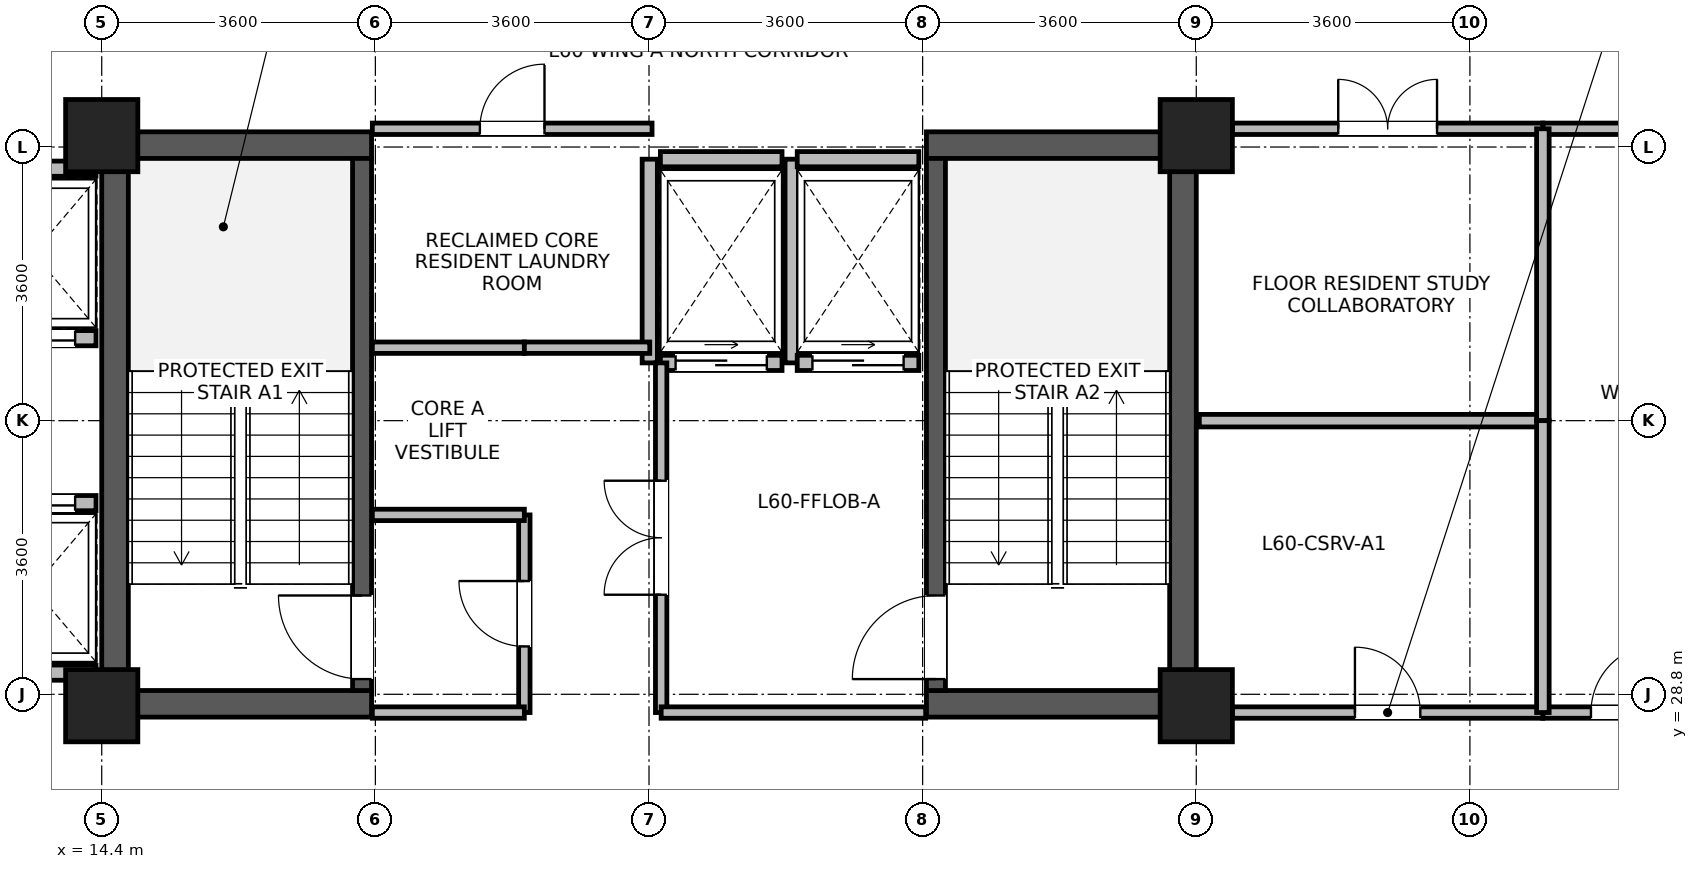
"""IFC4 building model, lengths in metres.
Left out: names, types, materials, properties, quantities, classifications, styles, units other than length and angle.
Written with IfcOpenShell. Run it as: python <this file> out.ifc"""

import sys

from ifc_helpers import new_model, si_unit, direction, frame, frame_2d, origin, origin_2d, place, context, subcontext, project, spatial, rectangle, extrude, source, transform, mapped, element, fill, save


model = new_model("IFC4")
c1 = context("Model", 3, precision=1e-05, world=origin(), true_north=direction((0.0, 1.0)))
c2 = subcontext(c1, "Body", "Model", "MODEL_VIEW")
j1 = project(units=[si_unit("LENGTHUNIT", "METRE"), si_unit("PLANEANGLEUNIT", "RADIAN")], contexts=[c1])
p1 = place(None, origin())
s1 = spatial("IfcSite", under=j1, at=p1, CompositionType="ELEMENT")
p2 = place(p1, origin())
s2 = spatial("IfcBuilding", under=s1, at=p2, CompositionType="ELEMENT")
p3 = place(p2, frame((0.0, 0.0, 235.1)))
s3 = spatial("IfcBuildingStorey", under=s2, at=p3, CompositionType="ELEMENT", Elevation=235.1)
for number, where, z_axis, x_axis in (
    (1, (14.575, 28.5, 0.0), (0.0, 0.0, 1.0), (0.0, 1.0, 0.0)),
    (2, (28.625, 28.5, 0.0), (0.0, 0.0, 1.0), (0.0, 1.0, 0.0)),
):
    element("IfcWall", number, at=place(p3, frame(where, z_axis=z_axis, x_axis=x_axis)), inside=s3, PredefinedType="SHEAR", context=c2, shape_type="SweptSolid", body=[
        extrude(rectangle(XDim=7.7, YDim=0.35, at=frame_2d((3.85, 0.0))), origin(), (0.0, 0.0, 1.0), 3.44),
    ])
for number, where, z_axis, x_axis in (
    (3, (14.75, 28.675, 0.0), (0.0, 0.0, 1.0), (1.0, 0.0, 0.0)),
    (4, (25.25, 28.675, 0.0), (0.0, 0.0, 1.0), (1.0, 0.0, 0.0)),
    (5, (14.75, 36.025, 0.0), (0.0, 0.0, 1.0), (1.0, 0.0, 0.0)),
    (6, (25.25, 36.025, 0.0), (0.0, 0.0, 1.0), (1.0, 0.0, 0.0)),
):
    element("IfcWall", number, at=place(p3, frame(where, z_axis=z_axis, x_axis=x_axis)), inside=s3, PredefinedType="SHEAR", context=c2, shape_type="SweptSolid", body=[
        extrude(rectangle(XDim=3.2, YDim=0.35, at=frame_2d((1.6, 0.0))), origin(), (0.0, 0.0, 1.0), 3.44),
    ])
p4 = place(p3, frame((17.825, 28.85, 0.0), z_axis=(0.0, 0.0, 1.0), x_axis=(0.0, 1.0, 0.0)))
e7 = element("IfcWall", 7, at=p4, inside=s3, PredefinedType="SHEAR", context=c2, shape_type="SweptSolid", body=[
    extrude(rectangle(XDim=7.0, YDim=0.25, at=frame_2d((3.5, 0.0))), origin(), (0.0, 0.0, 1.0), 3.44),
])
p5 = place(p4, frame((0.15, 0.0, 0.0)))
e8 = element("IfcOpeningElement", 8, at=p5, cuts=e7, PredefinedType="OPENING", context=c2, shape_type="SweptSolid", body=[
    extrude(rectangle(XDim=1.1, YDim=2.08, at=frame_2d((0.55, 1.04))), frame((0.0, 0.135, 0.0), z_axis=(0.0, -1.0, 0.0), x_axis=(1.0, 0.0, 0.0)), (0.0, 0.0, 1.0), 0.27),
])
p6 = place(p3, frame((25.375, 28.85, 0.0), z_axis=(0.0, 0.0, 1.0), x_axis=(0.0, 1.0, 0.0)))
e9 = element("IfcWall", 9, at=p6, inside=s3, PredefinedType="SHEAR", context=c2, shape_type="SweptSolid", body=[
    extrude(rectangle(XDim=7.0, YDim=0.25, at=frame_2d((3.5, 0.0))), origin(), (0.0, 0.0, 1.0), 3.44),
])
p7 = place(p6, frame((0.15, 0.0, 0.0)))
e10 = element("IfcOpeningElement", 10, at=p7, cuts=e9, PredefinedType="OPENING", context=c2, shape_type="SweptSolid", body=[
    extrude(rectangle(XDim=1.1, YDim=2.08, at=frame_2d((0.55, 1.04))), frame((0.0, 0.135, 0.0), z_axis=(0.0, -1.0, 0.0), x_axis=(1.0, 0.0, 0.0)), (0.0, 0.0, 1.0), 0.27),
])
m1 = source(origin(), c2, "Body", "SweptSolid", [
    extrude(rectangle(XDim=0.95, YDim=0.95, at=origin_2d()), origin(), (0.0, 0.0, 1.0), 3.7),
])
for number, where, z_axis, x_axis in (
    (11, (14.4, 28.65, 0.0), (0.0, 0.0, 1.0), (1.0, 0.0, 0.0)),
    (12, (14.4, 36.15, 0.0), (0.0, 0.0, 1.0), (1.0, 0.0, 0.0)),
    (13, (28.8, 28.65, 0.0), (0.0, 0.0, 1.0), (1.0, 0.0, 0.0)),
    (14, (28.8, 36.15, 0.0), (0.0, 0.0, 1.0), (1.0, 0.0, 0.0)),
):
    element("IfcColumn", number, at=place(p3, frame(where, z_axis=z_axis, x_axis=x_axis)), inside=s3, PredefinedType="COLUMN", context=c2, shape_type="MappedRepresentation", body=[
        mapped(m1, transform((0.0, 0.0, 0.0), x_axis=(1.0, 0.0, 0.0), y_axis=(0.0, 1.0, 0.0), z_axis=(0.0, 0.0, 1.0), scale=1.0)),
    ])
p8 = place(p3, frame((12.675, 33.485, 0.0), z_axis=(0.0, 0.0, 1.0), x_axis=(1.0, 0.0, 0.0)))
e15 = element("IfcWall", 15, at=p8, inside=s3, PredefinedType="PARTITIONING", context=c2, shape_type="SweptSolid", body=[
    extrude(rectangle(XDim=1.65, YDim=0.2, at=frame_2d((0.825, 0.0))), origin(), (0.0, 0.0, 1.0), 3.42),
])
p9 = place(p8, frame((0.275, 0.0, 0.0)))
e16 = element("IfcOpeningElement", 16, at=p9, cuts=e15, PredefinedType="OPENING", context=c2, shape_type="SweptSolid", body=[
    extrude(rectangle(XDim=1.1, YDim=2.12, at=frame_2d((0.55, 1.06))), frame((0.0, 0.11, 0.0), z_axis=(0.0, -1.0, 0.0), x_axis=(1.0, 0.0, 0.0)), (0.0, 0.0, 1.0), 0.22),
])
for number, where, z_axis, x_axis in (
    (17, (12.675, 35.715, 0.0), (0.0, 0.0, 1.0), (1.0, 0.0, 0.0)),
    (18, (12.675, 29.085, 0.0), (0.0, 0.0, 1.0), (1.0, 0.0, 0.0)),
):
    element("IfcWall", number, at=place(p3, frame(where, z_axis=z_axis, x_axis=x_axis)), inside=s3, PredefinedType="PARTITIONING", context=c2, shape_type="SweptSolid", body=[
        extrude(rectangle(XDim=1.65, YDim=0.2, at=frame_2d((0.825, 0.0))), origin(), (0.0, 0.0, 1.0), 3.42),
    ])
p10 = place(p3, frame((12.675, 31.315, 0.0), z_axis=(0.0, 0.0, 1.0), x_axis=(1.0, 0.0, 0.0)))
e19 = element("IfcWall", 19, at=p10, inside=s3, PredefinedType="PARTITIONING", context=c2, shape_type="SweptSolid", body=[
    extrude(rectangle(XDim=1.65, YDim=0.2, at=frame_2d((0.825, 0.0))), origin(), (0.0, 0.0, 1.0), 3.42),
])
p11 = place(p10, frame((0.275, 0.0, 0.0)))
e20 = element("IfcOpeningElement", 20, at=p11, cuts=e19, PredefinedType="OPENING", context=c2, shape_type="SweptSolid", body=[
    extrude(rectangle(XDim=1.1, YDim=2.12, at=frame_2d((0.55, 1.06))), frame((0.0, 0.11, 0.0), z_axis=(0.0, -1.0, 0.0), x_axis=(1.0, 0.0, 0.0)), (0.0, 0.0, 1.0), 0.22),
])
p12 = place(p3, frame((21.75, 33.16, 0.0), z_axis=(0.0, 0.0, 1.0), x_axis=(1.0, 0.0, 0.0)))
e21 = element("IfcWall", 21, at=p12, inside=s3, PredefinedType="PARTITIONING", context=c2, shape_type="SweptSolid", body=[
    extrude(rectangle(XDim=1.6, YDim=0.2, at=frame_2d((0.8, 0.0))), origin(), (0.0, 0.0, 1.0), 3.42),
])
p13 = place(p12, frame((0.2, 0.0, 0.0)))
e22 = element("IfcOpeningElement", 22, at=p13, cuts=e21, PredefinedType="OPENING", context=c2, shape_type="SweptSolid", body=[
    extrude(rectangle(XDim=1.2, YDim=2.12, at=frame_2d((0.6, 1.06))), frame((0.0, 0.11, 0.0), z_axis=(0.0, -1.0, 0.0), x_axis=(1.0, 0.0, 0.0)), (0.0, 0.0, 1.0), 0.22),
])
p14 = place(p3, frame((21.75, 35.84, 0.0), z_axis=(0.0, 0.0, 1.0), x_axis=(1.0, 0.0, 0.0)))
e23 = element("IfcWall", 23, at=p14, inside=s3, PredefinedType="PARTITIONING", context=c2, shape_type="SweptSolid", body=[
    extrude(rectangle(XDim=1.6, YDim=0.2, at=frame_2d((0.8, 0.0))), origin(), (0.0, 0.0, 1.0), 2.52),
])
for number, where, z_axis, x_axis in (
    (24, (21.61, 33.16, 0.0), (0.0, 0.0, 1.0), (0.0, 1.0, 0.0)),
    (25, (23.49, 33.16, 0.0), (0.0, 0.0, 1.0), (0.0, 1.0, 0.0)),
):
    element("IfcWall", number, at=place(p3, frame(where, z_axis=z_axis, x_axis=x_axis)), inside=s3, PredefinedType="PARTITIONING", context=c2, shape_type="SweptSolid", body=[
        extrude(rectangle(XDim=2.68, YDim=0.2, at=frame_2d((1.34, 0.0))), origin(), (0.0, 0.0, 1.0), 3.42),
    ])
p15 = place(p3, frame((23.55, 33.16, 0.0), z_axis=(0.0, 0.0, 1.0), x_axis=(1.0, 0.0, 0.0)))
e26 = element("IfcWall", 26, at=p15, inside=s3, PredefinedType="PARTITIONING", context=c2, shape_type="SweptSolid", body=[
    extrude(rectangle(XDim=1.6, YDim=0.2, at=frame_2d((0.8, 0.0))), origin(), (0.0, 0.0, 1.0), 3.42),
])
p16 = place(p15, frame((0.2, 0.0, 0.0)))
e27 = element("IfcOpeningElement", 27, at=p16, cuts=e26, PredefinedType="OPENING", context=c2, shape_type="SweptSolid", body=[
    extrude(rectangle(XDim=1.2, YDim=2.12, at=frame_2d((0.6, 1.06))), frame((0.0, 0.11, 0.0), z_axis=(0.0, -1.0, 0.0), x_axis=(1.0, 0.0, 0.0)), (0.0, 0.0, 1.0), 0.22),
])
p17 = place(p3, frame((23.55, 35.84, 0.0), z_axis=(0.0, 0.0, 1.0), x_axis=(1.0, 0.0, 0.0)))
e28 = element("IfcWall", 28, at=p17, inside=s3, PredefinedType="PARTITIONING", context=c2, shape_type="SweptSolid", body=[
    extrude(rectangle(XDim=1.6, YDim=0.2, at=frame_2d((0.8, 0.0))), origin(), (0.0, 0.0, 1.0), 2.52),
])
p18 = place(p3, frame((33.36, 28.56, 0.0), z_axis=(0.0, 0.0, 1.0), x_axis=(1.0, 0.0, 0.0)))
e29 = element("IfcWall", 29, at=p18, inside=s3, PredefinedType="PARTITIONING", context=c2, shape_type="SweptSolid", body=[
    extrude(rectangle(XDim=2.165, YDim=0.15, at=frame_2d((1.083, 0.0))), origin(), (0.0, 0.0, 1.0), 2.87),
])
p19 = place(p18, frame((0.633, 0.0, 0.0)))
e30 = element("IfcOpeningElement", 30, at=p19, cuts=e29, PredefinedType="OPENING", context=c2, shape_type="SweptSolid", body=[
    extrude(rectangle(XDim=0.9, YDim=2.08, at=frame_2d((0.45, 1.04))), frame((0.0, 0.085, 0.0), z_axis=(0.0, -1.0, 0.0), x_axis=(1.0, 0.0, 0.0)), (0.0, 0.0, 1.0), 0.17),
])
p20 = place(p3, frame((33.36, 36.24, 0.0), z_axis=(0.0, 0.0, 1.0), x_axis=(1.0, 0.0, 0.0)))
e31 = element("IfcWall", 31, at=p20, inside=s3, PredefinedType="PARTITIONING", context=c2, shape_type="SweptSolid", body=[
    extrude(rectangle(XDim=2.165, YDim=0.15, at=frame_2d((1.083, 0.0))), origin(), (0.0, 0.0, 1.0), 2.87),
])
p21 = place(p3, frame((29.275, 28.56, 0.0), z_axis=(0.0, 0.0, 1.0), x_axis=(1.0, 0.0, 0.0)))
e32 = element("IfcWall", 32, at=p21, inside=s3, PredefinedType="PARTITIONING", context=c2, shape_type="SweptSolid", body=[
    extrude(rectangle(XDim=4.085, YDim=0.15, at=frame_2d((2.042, 0.0))), origin(), (0.0, 0.0, 1.0), 2.87),
])
p22 = place(p21, frame((1.613, 0.0, 0.0)))
e33 = element("IfcOpeningElement", 33, at=p22, cuts=e32, PredefinedType="OPENING", context=c2, shape_type="SweptSolid", body=[
    extrude(rectangle(XDim=0.86, YDim=2.02, at=frame_2d((0.43, 1.01))), frame((0.0, 0.085, 0.0), z_axis=(0.0, -1.0, 0.0), x_axis=(1.0, 0.0, 0.0)), (0.0, 0.0, 1.0), 0.17),
])
p23 = place(p3, frame((29.275, 36.24, 0.0), z_axis=(0.0, 0.0, 1.0), x_axis=(1.0, 0.0, 0.0)))
e34 = element("IfcWall", 34, at=p23, inside=s3, PredefinedType="PARTITIONING", context=c2, shape_type="SweptSolid", body=[
    extrude(rectangle(XDim=4.085, YDim=0.15, at=frame_2d((2.042, 0.0))), origin(), (0.0, 0.0, 1.0), 2.87),
])
p24 = place(p23, frame((1.393, 0.0, 0.0)))
e35 = element("IfcOpeningElement", 35, at=p24, cuts=e34, PredefinedType="OPENING", context=c2, shape_type="SweptSolid", body=[
    extrude(rectangle(XDim=1.3, YDim=2.12, at=frame_2d((0.65, 1.06))), frame((0.0, 0.085, 0.0), z_axis=(0.0, -1.0, 0.0), x_axis=(1.0, 0.0, 0.0)), (0.0, 0.0, 1.0), 0.17),
])
p25 = place(p3, frame((17.96, 36.24, 0.0), z_axis=(0.0, 0.0, 1.0), x_axis=(1.0, 0.0, 0.0)))
e36 = element("IfcWall", 36, at=p25, inside=s3, PredefinedType="PARTITIONING", context=c2, shape_type="SweptSolid", body=[
    extrude(rectangle(XDim=3.68, YDim=0.15, at=frame_2d((1.84, 0.0))), origin(), (0.0, 0.0, 1.0), 2.52),
])
p26 = place(p25, frame((1.415, 0.0, 0.0)))
e37 = element("IfcOpeningElement", 37, at=p26, cuts=e36, PredefinedType="OPENING", context=c2, shape_type="SweptSolid", body=[
    extrude(rectangle(XDim=0.85, YDim=2.04, at=frame_2d((0.425, 1.02))), frame((0.0, 0.085, 0.0), z_axis=(0.0, -1.0, 0.0), x_axis=(1.0, 0.0, 0.0)), (0.0, 0.0, 1.0), 0.17),
])
p27 = place(p3, frame((19.96, 28.56, 0.0), z_axis=(0.0, 0.0, 1.0), x_axis=(0.0, 1.0, 0.0)))
e38 = element("IfcWall", 38, at=p27, inside=s3, PredefinedType="PARTITIONING", context=c2, shape_type="SweptSolid", body=[
    extrude(rectangle(XDim=2.6, YDim=0.15, at=frame_2d((1.3, 0.0))), origin(), (0.0, 0.0, 1.0), 3.42),
])
p28 = place(p27, frame((0.87, 0.0, 0.0)))
e39 = element("IfcOpeningElement", 39, at=p28, cuts=e38, PredefinedType="OPENING", context=c2, shape_type="SweptSolid", body=[
    extrude(rectangle(XDim=0.86, YDim=2.02, at=frame_2d((0.43, 1.01))), frame((0.0, 0.085, 0.0), z_axis=(0.0, -1.0, 0.0), x_axis=(1.0, 0.0, 0.0)), (0.0, 0.0, 1.0), 0.17),
])
p29 = place(p3, frame((17.96, 28.56, 0.0), z_axis=(0.0, 0.0, 1.0), x_axis=(1.0, 0.0, 0.0)))
e40 = element("IfcWall", 40, at=p29, inside=s3, PredefinedType="PARTITIONING", context=c2, shape_type="SweptSolid", body=[
    extrude(rectangle(XDim=2.0, YDim=0.15, at=frame_2d((1.0, 0.0))), origin(), (0.0, 0.0, 1.0), 2.52),
])
for number, where, z_axis, x_axis in (
    (41, (17.96, 31.16, 0.0), (0.0, 0.0, 1.0), (1.0, 0.0, 0.0)),
    (42, (17.96, 33.36, 0.0), (0.0, 0.0, 1.0), (1.0, 0.0, 0.0)),
):
    element("IfcWall", number, at=place(p3, frame(where, z_axis=z_axis, x_axis=x_axis)), inside=s3, PredefinedType="PARTITIONING", context=c2, shape_type="SweptSolid", body=[
        extrude(rectangle(XDim=2.0, YDim=0.15, at=frame_2d((1.0, 0.0))), origin(), (0.0, 0.0, 1.0), 3.42),
    ])
p30 = place(p3, frame((19.96, 33.36, 0.0), z_axis=(0.0, 0.0, 1.0), x_axis=(1.0, 0.0, 0.0)))
e43 = element("IfcWall", 43, at=p30, inside=s3, PredefinedType="PARTITIONING", context=c2, shape_type="SweptSolid", body=[
    extrude(rectangle(XDim=1.65, YDim=0.15, at=frame_2d((0.825, 0.0))), origin(), (0.0, 0.0, 1.0), 3.42),
])
p31 = place(p3, frame((21.76, 28.56, 0.0), z_axis=(0.0, 0.0, 1.0), x_axis=(0.0, 1.0, 0.0)))
e44 = element("IfcWall", 44, at=p31, inside=s3, PredefinedType="PARTITIONING", context=c2, shape_type="SweptSolid", body=[
    extrude(rectangle(XDim=4.6, YDim=0.15, at=frame_2d((2.3, 0.0))), origin(), (0.0, 0.0, 1.0), 3.42),
])
p32 = place(p31, frame((1.55, 0.0, 0.0)))
e45 = element("IfcOpeningElement", 45, at=p32, cuts=e44, PredefinedType="OPENING", context=c2, shape_type="SweptSolid", body=[
    extrude(rectangle(XDim=1.5, YDim=2.1, at=frame_2d((0.75, 1.05))), frame((0.0, 0.085, 0.0), z_axis=(0.0, -1.0, 0.0), x_axis=(1.0, 0.0, 0.0)), (0.0, 0.0, 1.0), 0.17),
])
p33 = place(p3, frame((28.84, 32.4, 0.0), z_axis=(0.0, 0.0, 1.0), x_axis=(1.0, 0.0, 0.0)))
e46 = element("IfcWall", 46, at=p33, inside=s3, PredefinedType="PARTITIONING", context=c2, shape_type="SweptSolid", body=[
    extrude(rectangle(XDim=4.52, YDim=0.165, at=frame_2d((2.26, 0.0))), origin(), (0.0, 0.0, 1.0), 3.42),
])
p34 = place(p3, frame((33.36, 32.4, 0.0), z_axis=(0.0, 0.0, 1.0), x_axis=(0.0, 1.0, 0.0)))
e47 = element("IfcWall", 47, at=p34, inside=s3, PredefinedType="PARTITIONING", context=c2, shape_type="SweptSolid", body=[
    extrude(rectangle(XDim=3.84, YDim=0.165, at=frame_2d((1.92, 0.0))), origin(), (0.0, 0.0, 1.0), 3.42),
])
p35 = place(p3, frame((33.36, 28.56, 0.0), z_axis=(0.0, 0.0, 1.0), x_axis=(0.0, 1.0, 0.0)))
e48 = element("IfcWall", 48, at=p35, inside=s3, PredefinedType="PARTITIONING", context=c2, shape_type="SweptSolid", body=[
    extrude(rectangle(XDim=3.84, YDim=0.165, at=frame_2d((1.92, 0.0))), origin(), (0.0, 0.0, 1.0), 3.42),
])
p36 = place(p3, frame((21.76, 28.56, 0.0), z_axis=(0.0, 0.0, 1.0), x_axis=(1.0, 0.0, 0.0)))
e49 = element("IfcWall", 49, at=p36, inside=s3, PredefinedType="PARTITIONING", context=c2, shape_type="SweptSolid", body=[
    extrude(rectangle(XDim=3.48, YDim=0.15, at=frame_2d((1.74, 0.0))), origin(), (0.0, 0.0, 1.0), 2.52),
])
p37 = place(p5, origin())
e50 = element("IfcDoor", 50, at=p37, inside=s3, OperationType="SINGLE_SWING_RIGHT", PredefinedType="DOOR", context=c2, shape_type="SweptSolid", body=[
    extrude(rectangle(XDim=1.1, YDim=2.08, at=frame_2d((0.55, 1.04))), frame((0.0, 0.025, 0.0), z_axis=(0.0, -1.0, 0.0), x_axis=(1.0, 0.0, 0.0)), (0.0, 0.0, 1.0), 0.05),
])
fill(e8, e50)
p38 = place(p7, origin())
e51 = element("IfcDoor", 51, at=p38, inside=s3, OperationType="SINGLE_SWING_LEFT", PredefinedType="DOOR", context=c2, shape_type="SweptSolid", body=[
    extrude(rectangle(XDim=1.1, YDim=2.08, at=frame_2d((0.55, 1.04))), frame((0.0, 0.025, 0.0), z_axis=(0.0, -1.0, 0.0), x_axis=(1.0, 0.0, 0.0)), (0.0, 0.0, 1.0), 0.05),
])
fill(e10, e51)
p39 = place(p9, origin())
e52 = element("IfcDoor", 52, at=p39, inside=s3, OperationType="SLIDING_TO_LEFT", PredefinedType="DOOR", context=c2, shape_type="SweptSolid", body=[
    extrude(rectangle(XDim=1.1, YDim=2.12, at=frame_2d((0.55, 1.06))), frame((0.0, 0.025, 0.0), z_axis=(0.0, -1.0, 0.0), x_axis=(1.0, 0.0, 0.0)), (0.0, 0.0, 1.0), 0.05),
])
fill(e16, e52)
p40 = place(p11, origin())
e53 = element("IfcDoor", 53, at=p40, inside=s3, OperationType="SLIDING_TO_LEFT", PredefinedType="DOOR", context=c2, shape_type="SweptSolid", body=[
    extrude(rectangle(XDim=1.1, YDim=2.12, at=frame_2d((0.55, 1.06))), frame((0.0, 0.025, 0.0), z_axis=(0.0, -1.0, 0.0), x_axis=(1.0, 0.0, 0.0)), (0.0, 0.0, 1.0), 0.05),
])
fill(e20, e53)
p41 = place(p13, origin())
e54 = element("IfcDoor", 54, at=p41, inside=s3, OperationType="SLIDING_TO_RIGHT", PredefinedType="DOOR", context=c2, shape_type="SweptSolid", body=[
    extrude(rectangle(XDim=1.2, YDim=2.12, at=frame_2d((0.6, 1.06))), frame((0.0, 0.025, 0.0), z_axis=(0.0, -1.0, 0.0), x_axis=(1.0, 0.0, 0.0)), (0.0, 0.0, 1.0), 0.05),
])
fill(e22, e54)
p42 = place(p16, origin())
e55 = element("IfcDoor", 55, at=p42, inside=s3, OperationType="SLIDING_TO_RIGHT", PredefinedType="DOOR", context=c2, shape_type="SweptSolid", body=[
    extrude(rectangle(XDim=1.2, YDim=2.12, at=frame_2d((0.6, 1.06))), frame((0.0, 0.025, 0.0), z_axis=(0.0, -1.0, 0.0), x_axis=(1.0, 0.0, 0.0)), (0.0, 0.0, 1.0), 0.05),
])
fill(e27, e55)
p43 = place(p19, origin())
e56 = element("IfcDoor", 56, at=p43, inside=s3, OperationType="SINGLE_SWING_RIGHT", PredefinedType="DOOR", context=c2, shape_type="SweptSolid", body=[
    extrude(rectangle(XDim=0.9, YDim=2.08, at=frame_2d((0.45, 1.04))), frame((0.0, 0.025, 0.0), z_axis=(0.0, -1.0, 0.0), x_axis=(1.0, 0.0, 0.0)), (0.0, 0.0, 1.0), 0.05),
])
fill(e30, e56)
p44 = place(p22, origin())
e57 = element("IfcDoor", 57, at=p44, inside=s3, OperationType="SINGLE_SWING_LEFT", PredefinedType="DOOR", context=c2, shape_type="SweptSolid", body=[
    extrude(rectangle(XDim=0.86, YDim=2.02, at=frame_2d((0.43, 1.01))), frame((0.0, 0.025, 0.0), z_axis=(0.0, -1.0, 0.0), x_axis=(1.0, 0.0, 0.0)), (0.0, 0.0, 1.0), 0.05),
])
fill(e33, e57)
p45 = place(p24, origin())
e58 = element("IfcDoor", 58, at=p45, inside=s3, OperationType="DOUBLE_DOOR_SINGLE_SWING", PredefinedType="DOOR", context=c2, shape_type="SweptSolid", body=[
    extrude(rectangle(XDim=1.3, YDim=2.12, at=frame_2d((0.65, 1.06))), frame((0.0, 0.025, 0.0), z_axis=(0.0, -1.0, 0.0), x_axis=(1.0, 0.0, 0.0)), (0.0, 0.0, 1.0), 0.05),
])
fill(e35, e58)
p46 = place(p26, origin())
e59 = element("IfcDoor", 59, at=p46, inside=s3, OperationType="SINGLE_SWING_RIGHT", PredefinedType="DOOR", context=c2, shape_type="SweptSolid", body=[
    extrude(rectangle(XDim=0.85, YDim=2.04, at=frame_2d((0.425, 1.02))), frame((0.0, 0.025, 0.0), z_axis=(0.0, -1.0, 0.0), x_axis=(1.0, 0.0, 0.0)), (0.0, 0.0, 1.0), 0.05),
])
fill(e37, e59)
p47 = place(p28, origin())
e60 = element("IfcDoor", 60, at=p47, inside=s3, OperationType="SINGLE_SWING_RIGHT", PredefinedType="DOOR", context=c2, shape_type="SweptSolid", body=[
    extrude(rectangle(XDim=0.86, YDim=2.02, at=frame_2d((0.43, 1.01))), frame((0.0, 0.025, 0.0), z_axis=(0.0, -1.0, 0.0), x_axis=(1.0, 0.0, 0.0)), (0.0, 0.0, 1.0), 0.05),
])
fill(e39, e60)
p48 = place(p32, origin())
e61 = element("IfcDoor", 61, at=p48, inside=s3, OperationType="DOUBLE_DOOR_SINGLE_SWING", PredefinedType="DOOR", context=c2, shape_type="SweptSolid", body=[
    extrude(rectangle(XDim=1.5, YDim=2.1, at=frame_2d((0.75, 1.05))), frame((0.0, 0.025, 0.0), z_axis=(0.0, -1.0, 0.0), x_axis=(1.0, 0.0, 0.0)), (0.0, 0.0, 1.0), 0.05),
])
fill(e45, e61)
save(model, sys.argv[1])
